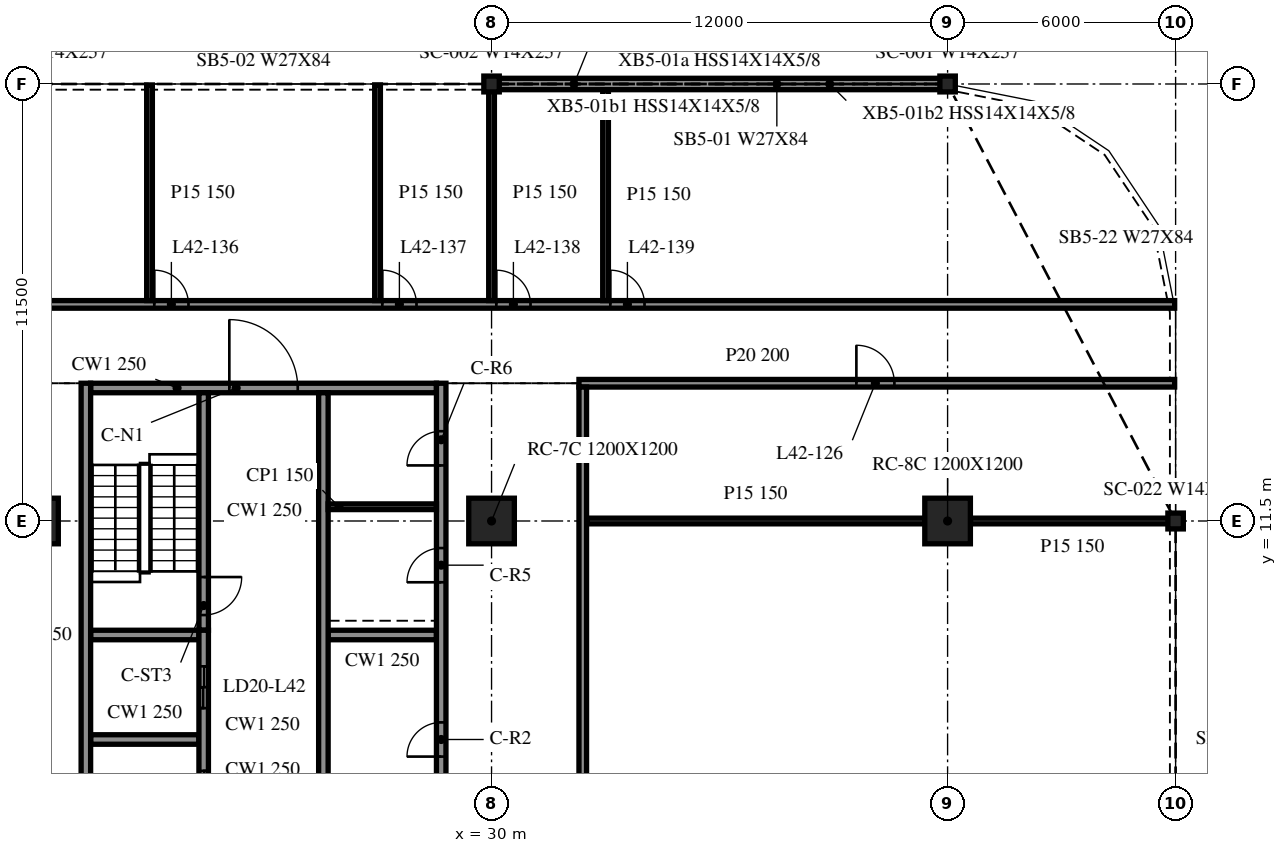
"""IFC4 building model, lengths in metres.
Left out: names, types, materials, properties, quantities, classifications, styles, units other than length and angle.
Written with IfcOpenShell. Run it as: python <this file> out.ifc"""

import sys

from ifc_helpers import new_model, si_unit, direction, frame, frame_2d, origin, origin_2d, place, context, subcontext, project, spatial, rectangle, i_section, extrude, element, fill, save


model = new_model("IFC4")
c1 = context("Model", 3, precision=1e-05, world=origin(), true_north=direction((0.0, 1.0)))
c2 = subcontext(c1, "Body", "Model", "MODEL_VIEW")
j1 = project(units=[si_unit("LENGTHUNIT", "METRE"), si_unit("PLANEANGLEUNIT", "RADIAN")], contexts=[c1])
p1 = place(None, origin())
s1 = spatial("IfcSite", under=j1, at=p1, CompositionType="ELEMENT")
p2 = place(p1, origin())
s2 = spatial("IfcBuilding", under=s1, at=p2, CompositionType="ELEMENT")
p3 = place(p2, frame((0.0, 0.0, 178.2)))
s3 = spatial("IfcBuildingStorey", under=s2, at=p3, CompositionType="ELEMENT", Elevation=178.2)
for number, where, z_axis, x_axis in (
    (1, (18.0, 11.5, -0.34), (0.0, 0.0, 1.0), (1.0, 0.0, 0.0)),
    (2, (30.0, 11.5, -0.34), (0.0, 0.0, 1.0), (1.0, 0.0, 0.0)),
    (3, (42.0, 11.5, -0.34), (0.0, 0.0, 1.0), (1.0, 0.0, 0.0)),
):
    element("IfcColumn", number, at=place(p3, frame(where, z_axis=z_axis, x_axis=x_axis)), inside=s3, PredefinedType="COLUMN", context=c2, shape_type="SweptSolid", body=[
        extrude(rectangle(XDim=1.2, YDim=1.2, at=origin_2d()), origin(), (0.0, 0.0, 1.0), 3.8),
    ])
for number, where, z_axis, x_axis in (
    (4, (42.0, 23.0, -0.34), (0.0, 0.0, 1.0), (1.0, 0.0, 0.0)),
    (5, (30.0, 23.0, -0.34), (0.0, 0.0, 1.0), (1.0, 0.0, 0.0)),
    (6, (48.0, 11.5, -0.34), (0.0, 0.0, 1.0), (1.0, 0.0, 0.0)),
):
    element("IfcColumn", number, at=place(p3, frame(where, z_axis=z_axis, x_axis=x_axis)), inside=s3, PredefinedType="COLUMN", context=c2, shape_type="SweptSolid", body=[
        extrude(i_section(OverallWidth=0.406, OverallDepth=0.417, WebThickness=0.03, FlangeThickness=0.048, at=origin_2d()), origin(), (0.0, 0.0, 1.0), 3.8),
    ])
p4 = place(p3, frame((41.985, 23.0, 0.0), z_axis=(0.0, 0.0, 1.0), x_axis=(-1.0, 0.0, 0.0)))
e7 = element("IfcWall", 7, at=p4, inside=s3, PredefinedType="NOTDEFINED", context=c2, shape_type="SweptSolid", body=[
    extrude(rectangle(XDim=11.97, YDim=0.3, at=frame_2d((5.985, 0.0))), origin(), (0.0, 0.0, 1.0), 2.782),
])
p5 = place(p3, frame((19.325, 15.125, 0.0), z_axis=(0.0, 0.0, 1.0), x_axis=(0.0, -1.0, 0.0)))
e8 = element("IfcWall", 8, at=p5, inside=s3, PredefinedType="SOLIDWALL", context=c2, shape_type="SweptSolid", body=[
    extrude(rectangle(XDim=24.25, YDim=0.25, at=frame_2d((12.125, 0.0))), origin(), (0.0, 0.0, 1.0), 3.46),
])
p6 = place(p3, frame((28.675, -9.125, 0.0), z_axis=(0.0, 0.0, 1.0), x_axis=(0.0, 1.0, 0.0)))
e9 = element("IfcWall", 9, at=p6, inside=s3, PredefinedType="SOLIDWALL", context=c2, shape_type="SweptSolid", body=[
    extrude(rectangle(XDim=24.25, YDim=0.25, at=frame_2d((12.125, 0.0))), origin(), (0.0, 0.0, 1.0), 3.46),
])
p7 = place(p6, frame((14.425, 0.0, 0.0)))
e10 = element("IfcOpeningElement", 10, at=p7, cuts=e9, PredefinedType="OPENING", context=c2, shape_type="SweptSolid", body=[
    extrude(rectangle(XDim=0.9, YDim=2.1, at=frame_2d((0.45, 1.05))), frame((0.0, 0.135, 0.0), z_axis=(0.0, -1.0, 0.0), x_axis=(1.0, 0.0, 0.0)), (0.0, 0.0, 1.0), 0.27),
])
p8 = place(p6, frame((19.012, 0.0, 0.0)))
e11 = element("IfcOpeningElement", 11, at=p8, cuts=e9, PredefinedType="OPENING", context=c2, shape_type="SweptSolid", body=[
    extrude(rectangle(XDim=0.9, YDim=2.1, at=frame_2d((0.45, 1.05))), frame((0.0, 0.135, 0.0), z_axis=(0.0, -1.0, 0.0), x_axis=(1.0, 0.0, 0.0)), (0.0, 0.0, 1.0), 0.27),
])
p9 = place(p6, frame((22.087, 0.0, 0.0)))
e12 = element("IfcOpeningElement", 12, at=p9, cuts=e9, PredefinedType="OPENING", context=c2, shape_type="SweptSolid", body=[
    extrude(rectangle(XDim=0.9, YDim=2.1, at=frame_2d((0.45, 1.05))), frame((0.0, 0.135, 0.0), z_axis=(0.0, -1.0, 0.0), x_axis=(1.0, 0.0, 0.0)), (0.0, 0.0, 1.0), 0.27),
])
p10 = place(p3, frame((19.45, 15.0, 0.0), z_axis=(0.0, 0.0, 1.0), x_axis=(1.0, 0.0, 0.0)))
e13 = element("IfcWall", 13, at=p10, inside=s3, PredefinedType="SOLIDWALL", context=c2, shape_type="SweptSolid", body=[
    extrude(rectangle(XDim=9.1, YDim=0.25, at=frame_2d((4.55, 0.0))), origin(), (0.0, 0.0, 1.0), 3.46),
])
p11 = place(p10, frame((3.65, 0.0, 0.0)))
e14 = element("IfcOpeningElement", 14, at=p11, cuts=e13, PredefinedType="OPENING", context=c2, shape_type="SweptSolid", body=[
    extrude(rectangle(XDim=1.8, YDim=2.1, at=frame_2d((0.9, 1.05))), frame((0.0, 0.135, 0.0), z_axis=(0.0, -1.0, 0.0), x_axis=(1.0, 0.0, 0.0)), (0.0, 0.0, 1.0), 0.27),
])
p12 = place(p3, frame((22.425, -8.875, 0.0), z_axis=(0.0, 0.0, 1.0), x_axis=(0.0, 1.0, 0.0)))
e15 = element("IfcWall", 15, at=p12, inside=s3, PredefinedType="SOLIDWALL", context=c2, shape_type="SweptSolid", body=[
    extrude(rectangle(XDim=17.5, YDim=0.25, at=frame_2d((8.75, 0.0))), origin(), (0.0, 0.0, 1.0), 3.46),
])
p13 = place(p12, frame((7.2, 0.0, 0.0)))
e16 = element("IfcOpeningElement", 16, at=p13, cuts=e15, PredefinedType="OPENING", context=c2, shape_type="SweptSolid", body=[
    extrude(rectangle(XDim=1.1, YDim=2.1, at=frame_2d((0.55, 1.05))), frame((0.0, 0.135, 0.0), z_axis=(0.0, -1.0, 0.0), x_axis=(1.0, 0.0, 0.0)), (0.0, 0.0, 1.0), 0.27),
])
p14 = place(p12, frame((9.95, 0.0, 0.0)))
e17 = element("IfcOpeningElement", 17, at=p14, cuts=e15, PredefinedType="OPENING", context=c2, shape_type="SweptSolid", body=[
    extrude(rectangle(XDim=1.1, YDim=2.1, at=frame_2d((0.55, 1.05))), frame((0.0, 0.135, 0.0), z_axis=(0.0, -1.0, 0.0), x_axis=(1.0, 0.0, 0.0)), (0.0, 0.0, 1.0), 0.27),
])
p15 = place(p12, frame((12.7, 0.0, 0.0)))
e18 = element("IfcOpeningElement", 18, at=p15, cuts=e15, PredefinedType="OPENING", context=c2, shape_type="SweptSolid", body=[
    extrude(rectangle(XDim=1.1, YDim=2.1, at=frame_2d((0.55, 1.05))), frame((0.0, 0.135, 0.0), z_axis=(0.0, -1.0, 0.0), x_axis=(1.0, 0.0, 0.0)), (0.0, 0.0, 1.0), 0.27),
])
p16 = place(p12, frame((15.45, 0.0, 0.0)))
e19 = element("IfcOpeningElement", 19, at=p16, cuts=e15, PredefinedType="OPENING", context=c2, shape_type="SweptSolid", body=[
    extrude(rectangle(XDim=1.1, YDim=2.1, at=frame_2d((0.55, 1.05))), frame((0.0, 0.135, 0.0), z_axis=(0.0, -1.0, 0.0), x_axis=(1.0, 0.0, 0.0)), (0.0, 0.0, 1.0), 0.27),
])
p17 = place(p12, frame((0.712, 0.0, 0.0)))
e20 = element("IfcOpeningElement", 20, at=p17, cuts=e15, PredefinedType="OPENING", context=c2, shape_type="SweptSolid", body=[
    extrude(rectangle(XDim=0.9, YDim=2.1, at=frame_2d((0.45, 1.05))), frame((0.0, 0.135, 0.0), z_axis=(0.0, -1.0, 0.0), x_axis=(1.0, 0.0, 0.0)), (0.0, 0.0, 1.0), 0.27),
])
p18 = place(p12, frame((3.788, 0.0, 0.0)))
e21 = element("IfcOpeningElement", 21, at=p18, cuts=e15, PredefinedType="OPENING", context=c2, shape_type="SweptSolid", body=[
    extrude(rectangle(XDim=0.9, YDim=2.1, at=frame_2d((0.45, 1.05))), frame((0.0, 0.135, 0.0), z_axis=(0.0, -1.0, 0.0), x_axis=(1.0, 0.0, 0.0)), (0.0, 0.0, 1.0), 0.27),
])
p19 = place(p3, frame((22.425, 14.875, 0.0), z_axis=(0.0, 0.0, 1.0), x_axis=(0.0, -1.0, 0.0)))
e22 = element("IfcWall", 22, at=p19, inside=s3, PredefinedType="SOLIDWALL", context=c2, shape_type="SweptSolid", body=[
    extrude(rectangle(XDim=6.25, YDim=0.25, at=frame_2d((3.125, 0.0))), origin(), (0.0, 0.0, 1.0), 3.46),
])
p20 = place(p19, frame((4.85, 0.0, 0.0)))
e23 = element("IfcOpeningElement", 23, at=p20, cuts=e22, PredefinedType="OPENING", context=c2, shape_type="SweptSolid", body=[
    extrude(rectangle(XDim=1.0, YDim=2.1, at=frame_2d((0.5, 1.05))), frame((0.0, 0.135, 0.0), z_axis=(0.0, -1.0, 0.0), x_axis=(1.0, 0.0, 0.0)), (0.0, 0.0, 1.0), 0.27),
])
p21 = place(p3, frame((25.575, 14.875, 0.0), z_axis=(0.0, 0.0, 1.0), x_axis=(0.0, -1.0, 0.0)))
e24 = element("IfcWall", 24, at=p21, inside=s3, PredefinedType="SOLIDWALL", context=c2, shape_type="SweptSolid", body=[
    extrude(rectangle(XDim=17.5, YDim=0.25, at=frame_2d((8.75, 0.0))), origin(), (0.0, 0.0, 1.0), 3.46),
])
p22 = place(p21, frame((15.45, 0.0, 0.0)))
e25 = element("IfcOpeningElement", 25, at=p22, cuts=e24, PredefinedType="OPENING", context=c2, shape_type="SweptSolid", body=[
    extrude(rectangle(XDim=1.1, YDim=2.1, at=frame_2d((0.55, 1.05))), frame((0.0, 0.135, 0.0), z_axis=(0.0, -1.0, 0.0), x_axis=(1.0, 0.0, 0.0)), (0.0, 0.0, 1.0), 0.27),
])
p23 = place(p21, frame((12.8, 0.0, 0.0)))
e26 = element("IfcOpeningElement", 26, at=p23, cuts=e24, PredefinedType="OPENING", context=c2, shape_type="SweptSolid", body=[
    extrude(rectangle(XDim=0.9, YDim=2.1, at=frame_2d((0.45, 1.05))), frame((0.0, 0.135, 0.0), z_axis=(0.0, -1.0, 0.0), x_axis=(1.0, 0.0, 0.0)), (0.0, 0.0, 1.0), 0.27),
])
for number, where, z_axis, x_axis in (
    (27, (19.45, 5.75, 0.0), (0.0, 0.0, 1.0), (1.0, 0.0, 0.0)),
    (28, (19.45, 8.5, 0.0), (0.0, 0.0, 1.0), (1.0, 0.0, 0.0)),
    (29, (25.7, 8.5, 0.0), (0.0, 0.0, 1.0), (1.0, 0.0, 0.0)),
):
    element("IfcWall", number, at=place(p3, frame(where, z_axis=z_axis, x_axis=x_axis)), inside=s3, PredefinedType="SOLIDWALL", context=c2, shape_type="SweptSolid", body=[
        extrude(rectangle(XDim=2.85, YDim=0.25, at=frame_2d((1.425, 0.0))), origin(), (0.0, 0.0, 1.0), 3.46),
    ])
p24 = place(p3, frame((25.7, 11.875, 0.0), z_axis=(0.0, 0.0, 1.0), x_axis=(1.0, 0.0, 0.0)))
e30 = element("IfcWall", 30, at=p24, inside=s3, PredefinedType="PARTITIONING", context=c2, shape_type="SweptSolid", body=[
    extrude(rectangle(XDim=2.85, YDim=0.15, at=frame_2d((1.425, 0.0))), origin(), (0.0, 0.0, 1.0), 3.46),
])
p25 = place(p3, frame((32.5, 11.5, 0.0), z_axis=(0.0, 0.0, 1.0), x_axis=(1.0, 0.0, 0.0)))
e31 = element("IfcWall", 31, at=p25, inside=s3, PredefinedType="PARTITIONING", context=c2, shape_type="SweptSolid", body=[
    extrude(rectangle(XDim=8.9, YDim=0.15, at=frame_2d((4.45, 0.0))), origin(), (0.0, 0.0, 1.0), 3.46),
])
p26 = place(p3, frame((42.6, 11.5, 0.0), z_axis=(0.0, 0.0, 1.0), x_axis=(1.0, 0.0, 0.0)))
e32 = element("IfcWall", 32, at=p26, inside=s3, PredefinedType="PARTITIONING", context=c2, shape_type="SweptSolid", body=[
    extrude(rectangle(XDim=5.375, YDim=0.15, at=frame_2d((2.688, 0.0))), origin(), (0.0, 0.0, 1.0), 3.46),
])
p27 = place(p3, frame((32.3, 15.125, 0.0), z_axis=(0.0, 0.0, 1.0), x_axis=(1.0, 0.0, 0.0)))
e33 = element("IfcWall", 33, at=p27, inside=s3, PredefinedType="PARTITIONING", context=c2, shape_type="SweptSolid", body=[
    extrude(rectangle(XDim=15.675, YDim=0.2, at=frame_2d((7.837, 0.0))), origin(), (0.0, 0.0, 1.0), 3.46),
])
p28 = place(p27, frame((7.3, 0.0, 0.0)))
e34 = element("IfcOpeningElement", 34, at=p28, cuts=e33, PredefinedType="OPENING", context=c2, shape_type="SweptSolid", body=[
    extrude(rectangle(XDim=1.0, YDim=2.1, at=frame_2d((0.5, 1.05))), frame((0.0, 0.11, 0.0), z_axis=(0.0, -1.0, 0.0), x_axis=(1.0, 0.0, 0.0)), (0.0, 0.0, 1.0), 0.22),
])
p29 = place(p3, frame((-47.975, 17.2, 0.0), z_axis=(0.0, 0.0, 1.0), x_axis=(1.0, 0.0, 0.0)))
e35 = element("IfcWall", 35, at=p29, inside=s3, PredefinedType="PARTITIONING", context=c2, shape_type="SweptSolid", body=[
    extrude(rectangle(XDim=95.95, YDim=0.2, at=frame_2d((47.975, 0.0))), origin(), (0.0, 0.0, 1.0), 3.46),
])
p30 = place(p29, frame((13.7, 0.0, 0.0)))
e36 = element("IfcOpeningElement", 36, at=p30, cuts=e35, PredefinedType="OPENING", context=c2, shape_type="SweptSolid", body=[
    extrude(rectangle(XDim=0.9, YDim=2.1, at=frame_2d((0.45, 1.05))), frame((0.0, 0.11, 0.0), z_axis=(0.0, -1.0, 0.0), x_axis=(1.0, 0.0, 0.0)), (0.0, 0.0, 1.0), 0.22),
])
p31 = place(p29, frame((19.7, 0.0, 0.0)))
e37 = element("IfcOpeningElement", 37, at=p31, cuts=e35, PredefinedType="OPENING", context=c2, shape_type="SweptSolid", body=[
    extrude(rectangle(XDim=0.9, YDim=2.1, at=frame_2d((0.45, 1.05))), frame((0.0, 0.11, 0.0), z_axis=(0.0, -1.0, 0.0), x_axis=(1.0, 0.0, 0.0)), (0.0, 0.0, 1.0), 0.22),
])
p32 = place(p29, frame((23.1, 0.0, 0.0)))
e38 = element("IfcOpeningElement", 38, at=p32, cuts=e35, PredefinedType="OPENING", context=c2, shape_type="SweptSolid", body=[
    extrude(rectangle(XDim=0.9, YDim=2.1, at=frame_2d((0.45, 1.05))), frame((0.0, 0.11, 0.0), z_axis=(0.0, -1.0, 0.0), x_axis=(1.0, 0.0, 0.0)), (0.0, 0.0, 1.0), 0.22),
])
p33 = place(p29, frame((25.7, 0.0, 0.0)))
e39 = element("IfcOpeningElement", 39, at=p33, cuts=e35, PredefinedType="OPENING", context=c2, shape_type="SweptSolid", body=[
    extrude(rectangle(XDim=0.9, YDim=2.1, at=frame_2d((0.45, 1.05))), frame((0.0, 0.11, 0.0), z_axis=(0.0, -1.0, 0.0), x_axis=(1.0, 0.0, 0.0)), (0.0, 0.0, 1.0), 0.22),
])
p34 = place(p29, frame((40.7, 0.0, 0.0)))
e40 = element("IfcOpeningElement", 40, at=p34, cuts=e35, PredefinedType="OPENING", context=c2, shape_type="SweptSolid", body=[
    extrude(rectangle(XDim=0.9, YDim=2.1, at=frame_2d((0.45, 1.05))), frame((0.0, 0.11, 0.0), z_axis=(0.0, -1.0, 0.0), x_axis=(1.0, 0.0, 0.0)), (0.0, 0.0, 1.0), 0.22),
])
p35 = place(p29, frame((46.7, 0.0, 0.0)))
e41 = element("IfcOpeningElement", 41, at=p35, cuts=e35, PredefinedType="OPENING", context=c2, shape_type="SweptSolid", body=[
    extrude(rectangle(XDim=0.9, YDim=2.1, at=frame_2d((0.45, 1.05))), frame((0.0, 0.11, 0.0), z_axis=(0.0, -1.0, 0.0), x_axis=(1.0, 0.0, 0.0)), (0.0, 0.0, 1.0), 0.22),
])
p36 = place(p29, frame((48.1, 0.0, 0.0)))
e42 = element("IfcOpeningElement", 42, at=p36, cuts=e35, PredefinedType="OPENING", context=c2, shape_type="SweptSolid", body=[
    extrude(rectangle(XDim=0.9, YDim=2.1, at=frame_2d((0.45, 1.05))), frame((0.0, 0.11, 0.0), z_axis=(0.0, -1.0, 0.0), x_axis=(1.0, 0.0, 0.0)), (0.0, 0.0, 1.0), 0.22),
])
p37 = place(p29, frame((51.5, 0.0, 0.0)))
e43 = element("IfcOpeningElement", 43, at=p37, cuts=e35, PredefinedType="OPENING", context=c2, shape_type="SweptSolid", body=[
    extrude(rectangle(XDim=0.9, YDim=2.1, at=frame_2d((0.45, 1.05))), frame((0.0, 0.11, 0.0), z_axis=(0.0, -1.0, 0.0), x_axis=(1.0, 0.0, 0.0)), (0.0, 0.0, 1.0), 0.22),
])
p38 = place(p29, frame((54.5, 0.0, 0.0)))
e44 = element("IfcOpeningElement", 44, at=p38, cuts=e35, PredefinedType="OPENING", context=c2, shape_type="SweptSolid", body=[
    extrude(rectangle(XDim=0.9, YDim=2.1, at=frame_2d((0.45, 1.05))), frame((0.0, 0.11, 0.0), z_axis=(0.0, -1.0, 0.0), x_axis=(1.0, 0.0, 0.0)), (0.0, 0.0, 1.0), 0.22),
])
p39 = place(p29, frame((69.1, 0.0, 0.0)))
e45 = element("IfcOpeningElement", 45, at=p39, cuts=e35, PredefinedType="OPENING", context=c2, shape_type="SweptSolid", body=[
    extrude(rectangle(XDim=0.9, YDim=2.1, at=frame_2d((0.45, 1.05))), frame((0.0, 0.11, 0.0), z_axis=(0.0, -1.0, 0.0), x_axis=(1.0, 0.0, 0.0)), (0.0, 0.0, 1.0), 0.22),
])
p40 = place(p29, frame((75.1, 0.0, 0.0)))
e46 = element("IfcOpeningElement", 46, at=p40, cuts=e35, PredefinedType="OPENING", context=c2, shape_type="SweptSolid", body=[
    extrude(rectangle(XDim=0.9, YDim=2.1, at=frame_2d((0.45, 1.05))), frame((0.0, 0.11, 0.0), z_axis=(0.0, -1.0, 0.0), x_axis=(1.0, 0.0, 0.0)), (0.0, 0.0, 1.0), 0.22),
])
p41 = place(p29, frame((78.1, 0.0, 0.0)))
e47 = element("IfcOpeningElement", 47, at=p41, cuts=e35, PredefinedType="OPENING", context=c2, shape_type="SweptSolid", body=[
    extrude(rectangle(XDim=0.9, YDim=2.1, at=frame_2d((0.45, 1.05))), frame((0.0, 0.11, 0.0), z_axis=(0.0, -1.0, 0.0), x_axis=(1.0, 0.0, 0.0)), (0.0, 0.0, 1.0), 0.22),
])
p42 = place(p29, frame((81.1, 0.0, 0.0)))
e48 = element("IfcOpeningElement", 48, at=p42, cuts=e35, PredefinedType="OPENING", context=c2, shape_type="SweptSolid", body=[
    extrude(rectangle(XDim=0.9, YDim=2.1, at=frame_2d((0.45, 1.05))), frame((0.0, 0.11, 0.0), z_axis=(0.0, -1.0, 0.0), x_axis=(1.0, 0.0, 0.0)), (0.0, 0.0, 1.0), 0.22),
])
for number, where, z_axis, x_axis in (
    (49, (21.0, 17.3, 0.0), (0.0, 0.0, 1.0), (0.0, 1.0, 0.0)),
    (50, (27.0, 17.3, 0.0), (0.0, 0.0, 1.0), (0.0, 1.0, 0.0)),
    (51, (30.0, 17.3, 0.0), (0.0, 0.0, 1.0), (0.0, 1.0, 0.0)),
):
    element("IfcWall", number, at=place(p3, frame(where, z_axis=z_axis, x_axis=x_axis)), inside=s3, PredefinedType="PARTITIONING", context=c2, shape_type="SweptSolid", body=[
        extrude(rectangle(XDim=5.675, YDim=0.15, at=frame_2d((2.837, 0.0))), origin(), (0.0, 0.0, 1.0), 3.46),
    ])
p43 = place(p3, frame((32.4, -9.025, 0.0), z_axis=(0.0, 0.0, 1.0), x_axis=(0.0, 1.0, 0.0)))
e52 = element("IfcWall", 52, at=p43, inside=s3, PredefinedType="PARTITIONING", context=c2, shape_type="SweptSolid", body=[
    extrude(rectangle(XDim=24.05, YDim=0.2, at=frame_2d((12.025, 0.0))), origin(), (0.0, 0.0, 1.0), 3.46),
])
p44 = place(p43, frame((11.5, 0.0, 0.0)))
e53 = element("IfcOpeningElement", 53, at=p44, cuts=e52, PredefinedType="OPENING", context=c2, shape_type="SweptSolid", body=[
    extrude(rectangle(XDim=1.0, YDim=2.1, at=frame_2d((0.5, 1.05))), frame((0.0, 0.11, 0.0), z_axis=(0.0, -1.0, 0.0), x_axis=(1.0, 0.0, 0.0)), (0.0, 0.0, 1.0), 0.22),
])
p45 = place(p3, frame((33.0, 17.3, 0.0), z_axis=(0.0, 0.0, 1.0), x_axis=(0.0, 1.0, 0.0)))
e54 = element("IfcWall", 54, at=p45, inside=s3, PredefinedType="PARTITIONING", context=c2, shape_type="SweptSolid", body=[
    extrude(rectangle(XDim=5.55, YDim=0.15, at=frame_2d((2.775, 0.0))), origin(), (0.0, 0.0, 1.0), 3.46),
])
p46 = place(p11, origin())
e55 = element("IfcDoor", 55, at=p46, inside=s3, OperationType="DOUBLE_DOOR_SINGLE_SWING", PredefinedType="DOOR", context=c2, shape_type="SweptSolid", body=[
    extrude(rectangle(XDim=1.8, YDim=2.1, at=frame_2d((0.9, 1.05))), frame((0.0, 0.025, 0.0), z_axis=(0.0, -1.0, 0.0), x_axis=(1.0, 0.0, 0.0)), (0.0, 0.0, 1.0), 0.05),
])
fill(e14, e55)
p47 = place(p15, origin())
e56 = element("IfcDoor", 56, at=p47, inside=s3, OperationType="DOUBLE_DOOR_SLIDING", PredefinedType="DOOR", context=c2, shape_type="SweptSolid", body=[
    extrude(rectangle(XDim=1.1, YDim=2.1, at=frame_2d((0.55, 1.05))), frame((0.0, 0.025, 0.0), z_axis=(0.0, -1.0, 0.0), x_axis=(1.0, 0.0, 0.0)), (0.0, 0.0, 1.0), 0.05),
])
fill(e18, e56)
p48 = place(p16, origin())
e57 = element("IfcDoor", 57, at=p48, inside=s3, OperationType="DOUBLE_DOOR_SLIDING", PredefinedType="DOOR", context=c2, shape_type="SweptSolid", body=[
    extrude(rectangle(XDim=1.1, YDim=2.1, at=frame_2d((0.55, 1.05))), frame((0.0, 0.025, 0.0), z_axis=(0.0, -1.0, 0.0), x_axis=(1.0, 0.0, 0.0)), (0.0, 0.0, 1.0), 0.05),
])
fill(e19, e57)
p49 = place(p7, origin())
e58 = element("IfcDoor", 58, at=p49, inside=s3, OperationType="SINGLE_SWING_RIGHT", PredefinedType="DOOR", context=c2, shape_type="SweptSolid", body=[
    extrude(rectangle(XDim=0.9, YDim=2.1, at=frame_2d((0.45, 1.05))), frame((0.0, 0.025, 0.0), z_axis=(0.0, -1.0, 0.0), x_axis=(1.0, 0.0, 0.0)), (0.0, 0.0, 1.0), 0.05),
])
fill(e10, e58)
p50 = place(p8, origin())
e59 = element("IfcDoor", 59, at=p50, inside=s3, OperationType="SINGLE_SWING_LEFT", PredefinedType="DOOR", context=c2, shape_type="SweptSolid", body=[
    extrude(rectangle(XDim=0.9, YDim=2.1, at=frame_2d((0.45, 1.05))), frame((0.0, 0.025, 0.0), z_axis=(0.0, -1.0, 0.0), x_axis=(1.0, 0.0, 0.0)), (0.0, 0.0, 1.0), 0.05),
])
fill(e11, e59)
p51 = place(p9, origin())
e60 = element("IfcDoor", 60, at=p51, inside=s3, OperationType="SINGLE_SWING_RIGHT", PredefinedType="DOOR", context=c2, shape_type="SweptSolid", body=[
    extrude(rectangle(XDim=0.9, YDim=2.1, at=frame_2d((0.45, 1.05))), frame((0.0, 0.025, 0.0), z_axis=(0.0, -1.0, 0.0), x_axis=(1.0, 0.0, 0.0)), (0.0, 0.0, 1.0), 0.05),
])
fill(e12, e60)
p52 = place(p20, origin())
e61 = element("IfcDoor", 61, at=p52, inside=s3, OperationType="SINGLE_SWING_LEFT", PredefinedType="DOOR", context=c2, shape_type="SweptSolid", body=[
    extrude(rectangle(XDim=1.0, YDim=2.1, at=frame_2d((0.5, 1.05))), frame((0.0, 0.025, 0.0), z_axis=(0.0, -1.0, 0.0), x_axis=(1.0, 0.0, 0.0)), (0.0, 0.0, 1.0), 0.05),
])
fill(e23, e61)
p53 = place(p28, origin())
e62 = element("IfcDoor", 62, at=p53, inside=s3, OperationType="SINGLE_SWING_LEFT", PredefinedType="DOOR", context=c2, shape_type="SweptSolid", body=[
    extrude(rectangle(XDim=1.0, YDim=2.1, at=frame_2d((0.5, 1.05))), frame((0.0, 0.025, 0.0), z_axis=(0.0, -1.0, 0.0), x_axis=(1.0, 0.0, 0.0)), (0.0, 0.0, 1.0), 0.05),
])
fill(e34, e62)
p54 = place(p39, origin())
e63 = element("IfcDoor", 63, at=p54, inside=s3, OperationType="SINGLE_SWING_RIGHT", PredefinedType="DOOR", context=c2, shape_type="SweptSolid", body=[
    extrude(rectangle(XDim=0.9, YDim=2.1, at=frame_2d((0.45, 1.05))), frame((0.0, 0.025, 0.0), z_axis=(0.0, -1.0, 0.0), x_axis=(1.0, 0.0, 0.0)), (0.0, 0.0, 1.0), 0.05),
])
fill(e45, e63)
p55 = place(p40, origin())
e64 = element("IfcDoor", 64, at=p55, inside=s3, OperationType="SINGLE_SWING_RIGHT", PredefinedType="DOOR", context=c2, shape_type="SweptSolid", body=[
    extrude(rectangle(XDim=0.9, YDim=2.1, at=frame_2d((0.45, 1.05))), frame((0.0, 0.025, 0.0), z_axis=(0.0, -1.0, 0.0), x_axis=(1.0, 0.0, 0.0)), (0.0, 0.0, 1.0), 0.05),
])
fill(e46, e64)
p56 = place(p41, origin())
e65 = element("IfcDoor", 65, at=p56, inside=s3, OperationType="SINGLE_SWING_RIGHT", PredefinedType="DOOR", context=c2, shape_type="SweptSolid", body=[
    extrude(rectangle(XDim=0.9, YDim=2.1, at=frame_2d((0.45, 1.05))), frame((0.0, 0.025, 0.0), z_axis=(0.0, -1.0, 0.0), x_axis=(1.0, 0.0, 0.0)), (0.0, 0.0, 1.0), 0.05),
])
fill(e47, e65)
p57 = place(p42, origin())
e66 = element("IfcDoor", 66, at=p57, inside=s3, OperationType="SINGLE_SWING_RIGHT", PredefinedType="DOOR", context=c2, shape_type="SweptSolid", body=[
    extrude(rectangle(XDim=0.9, YDim=2.1, at=frame_2d((0.45, 1.05))), frame((0.0, 0.025, 0.0), z_axis=(0.0, -1.0, 0.0), x_axis=(1.0, 0.0, 0.0)), (0.0, 0.0, 1.0), 0.05),
])
fill(e48, e66)
save(model, sys.argv[1])
